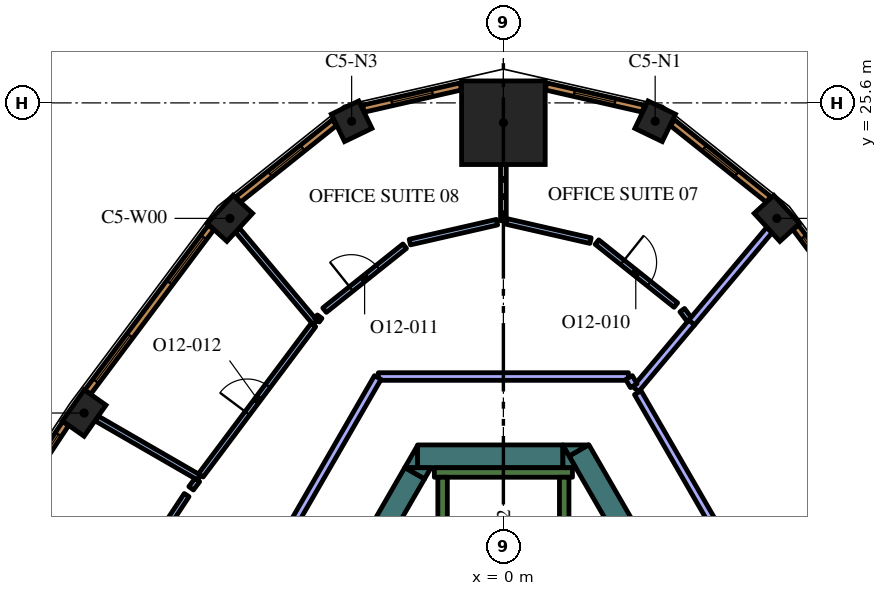
"""IFC4 building model, lengths in metres.
Left out: names, types, materials, properties, quantities, classifications, styles, units other than length and angle.
Written with IfcOpenShell. Run it as: python <this file> out.ifc"""

import sys

from ifc_helpers import new_model, si_unit, direction, frame, frame_2d, origin, origin_2d, place, context, subcontext, project, spatial, polyline, rectangle, outline, extrude, element, fill, save


model = new_model("IFC4")
c1 = context("Model", 3, precision=1e-05, world=origin(), true_north=direction((0.0, 1.0)))
c2 = subcontext(c1, "Body", "Model", "MODEL_VIEW")
j1 = project(units=[si_unit("LENGTHUNIT", "METRE"), si_unit("PLANEANGLEUNIT", "RADIAN")], contexts=[c1])
p1 = place(None, origin())
s1 = spatial("IfcSite", under=j1, at=p1, CompositionType="ELEMENT")
p2 = place(p1, origin())
s2 = spatial("IfcBuilding", under=s1, at=p2, CompositionType="ELEMENT")
p3 = place(p2, frame((0.0, 0.0, 283.8)))
s3 = spatial("IfcBuildingStorey", under=s2, at=p3, CompositionType="ELEMENT", Elevation=283.8)
p4 = place(p3, frame((0.0, 25.078, 0.0), z_axis=(0.0, 0.0, 1.0), x_axis=(0.0, 1.0, 0.0)))
e1 = element("IfcColumn", 1, at=p4, inside=s3, PredefinedType="COLUMN", context=c2, shape_type="SweptSolid", body=[
    extrude(rectangle(XDim=2.2, YDim=2.2, at=origin_2d()), origin(), (0.0, 0.0, 1.0), 4.2),
])
p5 = place(p3, frame((7.195, 22.561, 0.0), z_axis=(0.0, 0.0, 1.0), x_axis=(-0.67580250023, 0.737082750228, 0.0)))
e2 = element("IfcColumn", 2, at=p5, inside=s3, PredefinedType="COLUMN", context=c2, shape_type="SweptSolid", body=[
    extrude(rectangle(XDim=1.0, YDim=0.7, at=origin_2d()), origin(), (0.0, 0.0, 1.0), 4.2),
])
for number, where, z_axis, x_axis in (
    (3, (3.993, 25.116, 0.0), (0.0, 0.0, 1.0), (-0.901, 0.434, 0.0)),
    (4, (-3.993, 25.116, 0.0), (0.0, 0.0, 1.0), (-0.901, -0.434, 0.0)),
):
    element("IfcColumn", number, at=place(p3, frame(where, z_axis=z_axis, x_axis=x_axis)), inside=s3, PredefinedType="COLUMN", context=c2, shape_type="SweptSolid", body=[
        extrude(rectangle(XDim=0.8, YDim=0.8, at=origin_2d()), origin(), (0.0, 0.0, 1.0), 4.2),
    ])
for number, where, z_axis, x_axis in (
    (5, (-7.195, 22.561, 0.0), (0.0, 0.0, 1.0), (-0.676, -0.737, 0.0)),
    (6, (-11.032, 17.44, 0.0), (0.0, 0.0, 1.0), (-0.575, -0.818, 0.0)),
):
    element("IfcColumn", number, at=place(p3, frame(where, z_axis=z_axis, x_axis=x_axis)), inside=s3, PredefinedType="COLUMN", context=c2, shape_type="SweptSolid", body=[
        extrude(rectangle(XDim=1.0, YDim=0.7, at=origin_2d()), origin(), (0.0, 0.0, 1.0), 4.2),
    ])
p6 = place(p3, frame((1.989, 16.456, 0.0), z_axis=(0.0, 0.0, 1.0), x_axis=(0.49999102663, -0.8660305845, 0.0)))
e7 = element("IfcWall", 7, at=p6, inside=s3, PredefinedType="SOLIDWALL", context=c2, shape_type="SweptSolid", body=[
    extrude(rectangle(XDim=12.406, YDim=0.6, at=frame_2d((6.203, 0.0))), origin(), (0.0, 0.0, 1.0), 4.2),
])
p7 = place(p3, origin())
e8 = element("IfcWall", 8, at=p7, inside=s3, PredefinedType="SOLIDWALL", context=c2, shape_type="SweptSolid", body=[
    extrude(outline(polyline([(1.559, 16.6), (2.235, 16.6), (1.728, 16.307), (1.559, 16.6)])), origin(), (0.0, 0.0, 1.0), 4.2),
])
p8 = place(p3, frame((-2.258, 16.3, 0.0), z_axis=(0.0, 0.0, 1.0), x_axis=(1.0, 0.0, 0.0)))
e9 = element("IfcWall", 9, at=p8, inside=s3, PredefinedType="SOLIDWALL", context=c2, shape_type="SweptSolid", body=[
    extrude(rectangle(XDim=3.823, YDim=0.6, at=frame_2d((1.912, 0.0))), origin(), (0.0, 0.0, 1.0), 4.2),
])
e10 = element("IfcWall", 10, at=p7, inside=s3, PredefinedType="SOLIDWALL", context=c2, shape_type="SweptSolid", body=[
    extrude(outline(polyline([(1.905, 16.0), (1.567, 16.0), (1.567, 16.585), (1.905, 16.0)])), origin(), (0.0, 0.0, 1.0), 4.2),
])
e11 = element("IfcWall", 11, at=p7, inside=s3, PredefinedType="SOLIDWALL", context=c2, shape_type="SweptSolid", body=[
    extrude(outline(polyline([(-2.598, 16.0), (-2.26, 16.585), (-2.26, 16.0), (-2.598, 16.0)])), origin(), (0.0, 0.0, 1.0), 4.2),
])
p9 = place(p3, frame((-2.335, 15.855, 0.0), z_axis=(0.0, 0.0, 1.0), x_axis=(-0.499960127962, -0.866048422692, 0.0)))
e12 = element("IfcWall", 12, at=p9, inside=s3, PredefinedType="SOLIDWALL", context=c2, shape_type="SweptSolid", body=[
    extrude(rectangle(XDim=2.934, YDim=0.6, at=frame_2d((1.467, 0.0))), origin(), (0.0, 0.0, 1.0), 4.2),
])
e13 = element("IfcWall", 13, at=p7, inside=s3, PredefinedType="SOLIDWALL", context=c2, shape_type="SweptSolid", body=[
    extrude(outline(polyline([(-1.905, 16.0), (-2.074, 15.707), (-2.581, 16.0), (-1.905, 16.0)])), origin(), (0.0, 0.0, 1.0), 4.2),
])
p10 = place(p3, frame((-1.817, 15.875, 0.0), z_axis=(0.0, 0.0, 1.0), x_axis=(1.0, 0.0, 0.0)))
e14 = element("IfcWall", 14, at=p10, inside=s3, PredefinedType="SOLIDWALL", context=c2, shape_type="SweptSolid", body=[
    extrude(rectangle(XDim=3.634, YDim=0.25, at=frame_2d((1.817, 0.0))), origin(), (0.0, 0.0, 1.0), 4.2),
])
p11 = place(p3, frame((1.6, 8.95, 0.0), z_axis=(0.0, 0.0, 1.0), x_axis=(0.0, 1.0, 0.0)))
e15 = element("IfcWall", 15, at=p11, inside=s3, PredefinedType="SOLIDWALL", context=c2, shape_type="SweptSolid", body=[
    extrude(rectangle(XDim=6.8, YDim=0.25, at=frame_2d((3.4, 0.0))), origin(), (0.0, 0.0, 1.0), 4.2),
])
p12 = place(p3, frame((-1.6, 8.7, 0.0), z_axis=(0.0, 0.0, 1.0), x_axis=(0.0, 1.0, 0.0)))
e16 = element("IfcWall", 16, at=p12, inside=s3, PredefinedType="SOLIDWALL", context=c2, shape_type="SweptSolid", body=[
    extrude(rectangle(XDim=7.05, YDim=0.25, at=frame_2d((3.525, 0.0))), origin(), (0.0, 0.0, 1.0), 4.2),
])
p13 = place(p3, frame((4.95, 19.814, 0.0), z_axis=(0.0, 0.0, 1.0), x_axis=(0.642981953866, 0.765881326971, 0.0)))
e17 = element("IfcWall", 17, at=p13, inside=s3, PredefinedType="PARTITIONING", context=c2, shape_type="SweptSolid", body=[
    extrude(rectangle(XDim=3.188, YDim=0.2, at=frame_2d((1.594, 0.0))), origin(), (0.0, 0.0, 1.0), 3.55),
])
p14 = place(p3, frame((3.483, 18.067, 0.0), z_axis=(0.0, 0.0, 1.0), x_axis=(0.642896944312, 0.765952687177, 0.0)))
e18 = element("IfcWall", 18, at=p14, inside=s3, PredefinedType="PARTITIONING", context=c2, shape_type="SweptSolid", body=[
    extrude(rectangle(XDim=2.29, YDim=0.2, at=frame_2d((1.145, 0.0))), origin(), (0.0, 0.0, 1.0), 3.55),
])
p15 = place(p3, frame((7.421, 11.247, 0.0), z_axis=(0.0, 0.0, 1.0), x_axis=(-0.499999024953, 0.866025966727, 0.0)))
e19 = element("IfcWall", 19, at=p15, inside=s3, PredefinedType="PARTITIONING", context=c2, shape_type="SweptSolid", body=[
    extrude(rectangle(XDim=7.769, YDim=0.2, at=frame_2d((3.884, 0.0))), origin(), (0.0, 0.0, 1.0), 3.55),
])
p16 = place(p3, frame((0.0, 22.5, 0.0), z_axis=(0.0, 0.0, 1.0), x_axis=(0.0, 1.0, 0.0)))
e20 = element("IfcWall", 20, at=p16, inside=s3, PredefinedType="PARTITIONING", context=c2, shape_type="SweptSolid", body=[
    extrude(rectangle(XDim=1.479, YDim=0.15, at=frame_2d((0.739, 0.0))), origin(), (0.0, 0.0, 1.0), 3.55),
])
p17 = place(p3, frame((4.891, 19.899, 0.0), z_axis=(0.0, 0.0, 1.0), x_axis=(-0.6, 0.8, 0.0)))
e21 = element("IfcWall", 21, at=p17, inside=s3, PredefinedType="PARTITIONING", context=c2, shape_type="SweptSolid", body=[
    extrude(rectangle(XDim=0.309, YDim=0.15, at=frame_2d((0.154, 0.0))), origin(), (0.0, 0.0, 1.0), 3.55),
])
p18 = place(p3, frame((2.462, 21.937, 0.0), z_axis=(0.0, 0.0, 1.0), x_axis=(0.781630346222, -0.62374193531, 0.0)))
e22 = element("IfcWall", 22, at=p18, inside=s3, PredefinedType="PARTITIONING", context=c2, shape_type="SweptSolid", body=[
    extrude(rectangle(XDim=2.656, YDim=0.15, at=frame_2d((1.328, 0.0))), origin(), (0.0, 0.0, 1.0), 3.55),
])
p19 = place(p18, frame((0.857, 0.0, 0.0)))
e23 = element("IfcOpeningElement", 23, at=p19, cuts=e22, PredefinedType="OPENING", context=c2, shape_type="SweptSolid", body=[
    extrude(rectangle(XDim=0.9, YDim=2.1, at=frame_2d((0.45, 1.05))), frame((0.0, 0.085, 0.0), z_axis=(0.0, -1.0, 0.0), x_axis=(1.0, 0.0, 0.0)), (0.0, 0.0, 1.0), 0.17),
])
p20 = place(p3, frame((2.293, 21.976, 0.0), z_axis=(0.0, 0.0, 1.0), x_axis=(-0.974905760283, 0.22261796551, 0.0)))
e24 = element("IfcWall", 24, at=p20, inside=s3, PredefinedType="PARTITIONING", context=c2, shape_type="SweptSolid", body=[
    extrude(rectangle(XDim=2.276, YDim=0.15, at=frame_2d((1.138, 0.0))), origin(), (0.0, 0.0, 1.0), 3.55),
])
p21 = place(p3, frame((-4.952, 19.817, 0.0), z_axis=(0.0, 0.0, 1.0), x_axis=(-0.643023053688, 0.765846820471, 0.0)))
e25 = element("IfcWall", 25, at=p21, inside=s3, PredefinedType="PARTITIONING", context=c2, shape_type="SweptSolid", body=[
    extrude(rectangle(XDim=3.184, YDim=0.15, at=frame_2d((1.592, 0.0))), origin(), (0.0, 0.0, 1.0), 3.55),
])
p22 = place(p3, frame((-0.168, 22.461, 0.0), z_axis=(0.0, 0.0, 1.0), x_axis=(-0.974885550769, -0.222706450069, 0.0)))
e26 = element("IfcWall", 26, at=p22, inside=s3, PredefinedType="PARTITIONING", context=c2, shape_type="SweptSolid", body=[
    extrude(rectangle(XDim=2.353, YDim=0.15, at=frame_2d((1.176, 0.0))), origin(), (0.0, 0.0, 1.0), 3.55),
])
p23 = place(p3, frame((-4.706, 20.146, 0.0), z_axis=(0.0, 0.0, 1.0), x_axis=(0.781592149204, 0.623789798172, 0.0)))
e27 = element("IfcWall", 27, at=p23, inside=s3, PredefinedType="PARTITIONING", context=c2, shape_type="SweptSolid", body=[
    extrude(rectangle(XDim=2.698, YDim=0.15, at=frame_2d((1.349, 0.0))), origin(), (0.0, 0.0, 1.0), 3.55),
])
p24 = place(p23, frame((0.898, 0.0, 0.0)))
e28 = element("IfcOpeningElement", 28, at=p24, cuts=e27, PredefinedType="OPENING", context=c2, shape_type="SweptSolid", body=[
    extrude(rectangle(XDim=0.9, YDim=2.1, at=frame_2d((0.45, 1.05))), frame((0.0, 0.085, 0.0), z_axis=(0.0, -1.0, 0.0), x_axis=(1.0, 0.0, 0.0)), (0.0, 0.0, 1.0), 0.17),
])
p25 = place(p3, frame((-4.834, 19.975, 0.0), z_axis=(0.0, 0.0, 1.0), x_axis=(-0.599349659863, -0.800487342325, 0.0)))
e29 = element("IfcWall", 29, at=p25, inside=s3, PredefinedType="PARTITIONING", context=c2, shape_type="SweptSolid", body=[
    extrude(rectangle(XDim=0.12, YDim=0.15, at=frame_2d((0.06, 0.0))), origin(), (0.0, 0.0, 1.0), 3.55),
])
p26 = place(p3, frame((-8.007, 15.74, 0.0), z_axis=(0.0, 0.0, 1.0), x_axis=(-0.866044607523, 0.499966736674, 0.0)))
e30 = element("IfcWall", 30, at=p26, inside=s3, PredefinedType="PARTITIONING", context=c2, shape_type="SweptSolid", body=[
    extrude(rectangle(XDim=3.115, YDim=0.15, at=frame_2d((1.557, 0.0))), origin(), (0.0, 0.0, 1.0), 3.55),
])
p27 = place(p3, frame((-7.962, 15.8, 0.0), z_axis=(0.0, 0.0, 1.0), x_axis=(0.599541489613, 0.800343677574, 0.0)))
e31 = element("IfcWall", 31, at=p27, inside=s3, PredefinedType="PARTITIONING", context=c2, shape_type="SweptSolid", body=[
    extrude(rectangle(XDim=4.942, YDim=0.15, at=frame_2d((2.471, 0.0))), origin(), (0.0, 0.0, 1.0), 3.55),
])
p28 = place(p27, frame((2.042, 0.0, 0.0)))
e32 = element("IfcOpeningElement", 32, at=p28, cuts=e31, PredefinedType="OPENING", context=c2, shape_type="SweptSolid", body=[
    extrude(rectangle(XDim=0.9, YDim=2.1, at=frame_2d((0.45, 1.05))), frame((0.0, 0.085, 0.0), z_axis=(0.0, -1.0, 0.0), x_axis=(1.0, 0.0, 0.0)), (0.0, 0.0, 1.0), 0.17),
])
p29 = place(p3, frame((-8.052, 15.679, 0.0), z_axis=(0.0, 0.0, 1.0), x_axis=(-0.599004157744, -0.800745914136, 0.0)))
e33 = element("IfcWall", 33, at=p29, inside=s3, PredefinedType="PARTITIONING", context=c2, shape_type="SweptSolid", body=[
    extrude(rectangle(XDim=0.275, YDim=0.15, at=frame_2d((0.137, 0.0))), origin(), (0.0, 0.0, 1.0), 3.55),
])
p30 = place(p3, frame((-11.523, 10.449, 0.0), z_axis=(0.0, 0.0, 1.0), x_axis=(0.550751709023, 0.834669129061, 0.0)))
e34 = element("IfcWall", 34, at=p30, inside=s3, PredefinedType="PARTITIONING", context=c2, shape_type="SweptSolid", body=[
    extrude(rectangle(XDim=5.788, YDim=0.15, at=frame_2d((2.894, 0.0))), origin(), (0.0, 0.0, 1.0), 3.55),
])
p31 = place(p30, frame((2.488, 0.0, 0.0)))
e35 = element("IfcOpeningElement", 35, at=p31, cuts=e34, PredefinedType="OPENING", context=c2, shape_type="SweptSolid", body=[
    extrude(rectangle(XDim=0.9, YDim=2.1, at=frame_2d((0.45, 1.05))), frame((0.0, 0.085, 0.0), z_axis=(0.0, -1.0, 0.0), x_axis=(1.0, 0.0, 0.0)), (0.0, 0.0, 1.0), 0.17),
])
p32 = place(p3, frame((3.291, 18.4, 0.0), z_axis=(0.0, 0.0, 1.0), x_axis=(-1.0, 0.0, 0.0)))
e36 = element("IfcWall", 36, at=p32, inside=s3, PredefinedType="PARTITIONING", context=c2, shape_type="SweptSolid", body=[
    extrude(rectangle(XDim=6.582, YDim=0.2, at=frame_2d((3.291, 0.0))), origin(), (0.0, 0.0, 1.0), 3.55),
])
p33 = place(p3, frame((-3.306, 18.374, 0.0), z_axis=(0.0, 0.0, 1.0), x_axis=(-0.499999798456, -0.866025520146, 0.0)))
e37 = element("IfcWall", 37, at=p33, inside=s3, PredefinedType="PARTITIONING", context=c2, shape_type="SweptSolid", body=[
    extrude(rectangle(XDim=8.229, YDim=0.2, at=frame_2d((4.115, 0.0))), origin(), (0.0, 0.0, 1.0), 3.55),
])
p34 = place(p3, frame((3.43, 18.159, 0.0), z_axis=(0.0, 0.0, 1.0), x_axis=(-0.499949632511, 0.866054481515, 0.0)))
e38 = element("IfcWall", 38, at=p34, inside=s3, PredefinedType="PARTITIONING", context=c2, shape_type="SweptSolid", body=[
    extrude(rectangle(XDim=0.248, YDim=0.2, at=frame_2d((0.124, 0.0))), origin(), (0.0, 0.0, 1.0), 3.55),
])
p35 = place(p3, frame((10.938, 17.99, 0.0), z_axis=(0.0, 0.0, 1.0), x_axis=(-0.599559865294, 0.800329911929, 0.0)))
e39 = element("IfcWall", 39, at=p35, inside=s3, PredefinedType="SOLIDWALL", context=c2, shape_type="SweptSolid", body=[
    extrude(rectangle(XDim=5.415, YDim=0.19, at=frame_2d((2.708, 0.0))), origin(), (0.0, 0.0, 1.0), 3.95),
])
p36 = place(p35, frame((0.358, 0.0, 0.6)))
e40 = element("IfcOpeningElement", 40, at=p36, cuts=e39, PredefinedType="OPENING", context=c2, shape_type="SweptSolid", body=[
    extrude(rectangle(XDim=1.5, YDim=2.85, at=frame_2d((0.75, 1.425))), frame((0.0, 0.105, 0.0), z_axis=(0.0, -1.0, 0.0), x_axis=(1.0, 0.0, 0.0)), (0.0, 0.0, 1.0), 0.21),
])
p37 = place(p35, frame((3.593, 0.0, 0.6)))
e41 = element("IfcOpeningElement", 41, at=p37, cuts=e39, PredefinedType="OPENING", context=c2, shape_type="SweptSolid", body=[
    extrude(rectangle(XDim=1.5, YDim=2.85, at=frame_2d((0.75, 1.425))), frame((0.0, 0.105, 0.0), z_axis=(0.0, -1.0, 0.0), x_axis=(1.0, 0.0, 0.0)), (0.0, 0.0, 1.0), 0.21),
])
p38 = place(p3, frame((6.977, 23.061, 0.0), z_axis=(0.0, 0.0, 1.0), x_axis=(-0.781626234064, 0.623747088349, 0.0)))
e42 = element("IfcWall", 42, at=p38, inside=s3, PredefinedType="SOLIDWALL", context=c2, shape_type="SweptSolid", body=[
    extrude(rectangle(XDim=3.237, YDim=0.19, at=frame_2d((1.618, 0.0))), origin(), (0.0, 0.0, 1.0), 3.95),
])
p39 = place(p38, frame((1.068, 0.0, 0.6)))
e43 = element("IfcOpeningElement", 43, at=p39, cuts=e42, PredefinedType="OPENING", context=c2, shape_type="SweptSolid", body=[
    extrude(rectangle(XDim=1.1, YDim=2.85, at=frame_2d((0.55, 1.425))), frame((0.0, 0.105, 0.0), z_axis=(0.0, -1.0, 0.0), x_axis=(1.0, 0.0, 0.0)), (0.0, 0.0, 1.0), 0.21),
])
p40 = place(p3, frame((3.683, 25.449, 0.0), z_axis=(0.0, 0.0, 1.0), x_axis=(-0.974913273386, 0.222585060988, 0.0)))
e44 = element("IfcWall", 44, at=p40, inside=s3, PredefinedType="SOLIDWALL", context=c2, shape_type="SweptSolid", body=[
    extrude(rectangle(XDim=2.627, YDim=0.19, at=frame_2d((1.313, 0.0))), origin(), (0.0, 0.0, 1.0), 3.95),
])
p41 = place(p40, frame((0.763, 0.0, 0.6)))
e45 = element("IfcOpeningElement", 45, at=p41, cuts=e44, PredefinedType="OPENING", context=c2, shape_type="SweptSolid", body=[
    extrude(rectangle(XDim=1.1, YDim=2.85, at=frame_2d((0.55, 1.425))), frame((0.0, 0.105, 0.0), z_axis=(0.0, -1.0, 0.0), x_axis=(1.0, 0.0, 0.0)), (0.0, 0.0, 1.0), 0.21),
])
p42 = place(p3, frame((-1.122, 26.033, 0.0), z_axis=(0.0, 0.0, 1.0), x_axis=(-0.974913273386, -0.222585060988, 0.0)))
e46 = element("IfcWall", 46, at=p42, inside=s3, PredefinedType="SOLIDWALL", context=c2, shape_type="SweptSolid", body=[
    extrude(rectangle(XDim=2.627, YDim=0.19, at=frame_2d((1.313, 0.0))), origin(), (0.0, 0.0, 1.0), 3.95),
])
p43 = place(p42, frame((0.763, 0.0, 0.6)))
e47 = element("IfcOpeningElement", 47, at=p43, cuts=e46, PredefinedType="OPENING", context=c2, shape_type="SweptSolid", body=[
    extrude(rectangle(XDim=1.1, YDim=2.85, at=frame_2d((0.55, 1.425))), frame((0.0, 0.105, 0.0), z_axis=(0.0, -1.0, 0.0), x_axis=(1.0, 0.0, 0.0)), (0.0, 0.0, 1.0), 0.21),
])
p44 = place(p3, frame((-4.448, 25.08, 0.0), z_axis=(0.0, 0.0, 1.0), x_axis=(-0.781626234064, -0.623747088349, 0.0)))
e48 = element("IfcWall", 48, at=p44, inside=s3, PredefinedType="SOLIDWALL", context=c2, shape_type="SweptSolid", body=[
    extrude(rectangle(XDim=3.237, YDim=0.19, at=frame_2d((1.618, 0.0))), origin(), (0.0, 0.0, 1.0), 3.95),
])
p45 = place(p44, frame((1.068, 0.0, 0.6)))
e49 = element("IfcOpeningElement", 49, at=p45, cuts=e48, PredefinedType="OPENING", context=c2, shape_type="SweptSolid", body=[
    extrude(rectangle(XDim=1.1, YDim=2.85, at=frame_2d((0.55, 1.425))), frame((0.0, 0.105, 0.0), z_axis=(0.0, -1.0, 0.0), x_axis=(1.0, 0.0, 0.0)), (0.0, 0.0, 1.0), 0.21),
])
p46 = place(p3, frame((-7.692, 22.324, 0.0), z_axis=(0.0, 0.0, 1.0), x_axis=(-0.599559865294, -0.800329911929, 0.0)))
e50 = element("IfcWall", 50, at=p46, inside=s3, PredefinedType="SOLIDWALL", context=c2, shape_type="SweptSolid", body=[
    extrude(rectangle(XDim=5.415, YDim=0.19, at=frame_2d((2.708, 0.0))), origin(), (0.0, 0.0, 1.0), 3.95),
])
p47 = place(p46, frame((0.323, 0.0, 0.6)))
e51 = element("IfcOpeningElement", 51, at=p47, cuts=e50, PredefinedType="OPENING", context=c2, shape_type="SweptSolid", body=[
    extrude(rectangle(XDim=1.5, YDim=2.85, at=frame_2d((0.75, 1.425))), frame((0.0, 0.105, 0.0), z_axis=(0.0, -1.0, 0.0), x_axis=(1.0, 0.0, 0.0)), (0.0, 0.0, 1.0), 0.21),
])
p48 = place(p46, frame((3.558, 0.0, 0.6)))
e52 = element("IfcOpeningElement", 52, at=p48, cuts=e50, PredefinedType="OPENING", context=c2, shape_type="SweptSolid", body=[
    extrude(rectangle(XDim=1.5, YDim=2.85, at=frame_2d((0.75, 1.425))), frame((0.0, 0.105, 0.0), z_axis=(0.0, -1.0, 0.0), x_axis=(1.0, 0.0, 0.0)), (0.0, 0.0, 1.0), 0.21),
])
p49 = place(p3, frame((-11.518, 17.166, 0.0), z_axis=(0.0, 0.0, 1.0), x_axis=(-0.550744054781, -0.83467417962, 0.0)))
e53 = element("IfcWall", 53, at=p49, inside=s3, PredefinedType="SOLIDWALL", context=c2, shape_type="SweptSolid", body=[
    extrude(rectangle(XDim=5.406, YDim=0.19, at=frame_2d((2.703, 0.0))), origin(), (0.0, 0.0, 1.0), 3.95),
])
p50 = place(p49, frame((0.346, 0.0, 0.6)))
e54 = element("IfcOpeningElement", 54, at=p50, cuts=e53, PredefinedType="OPENING", context=c2, shape_type="SweptSolid", body=[
    extrude(rectangle(XDim=1.5, YDim=2.85, at=frame_2d((0.75, 1.425))), frame((0.0, 0.105, 0.0), z_axis=(0.0, -1.0, 0.0), x_axis=(1.0, 0.0, 0.0)), (0.0, 0.0, 1.0), 0.21),
])
p51 = place(p49, frame((3.559, 0.0, 0.6)))
e55 = element("IfcOpeningElement", 55, at=p51, cuts=e53, PredefinedType="OPENING", context=c2, shape_type="SweptSolid", body=[
    extrude(rectangle(XDim=1.5, YDim=2.85, at=frame_2d((0.75, 1.425))), frame((0.0, 0.105, 0.0), z_axis=(0.0, -1.0, 0.0), x_axis=(1.0, 0.0, 0.0)), (0.0, 0.0, 1.0), 0.21),
])
p52 = place(p19, origin())
e56 = element("IfcDoor", 56, at=p52, inside=s3, OperationType="SINGLE_SWING_LEFT", PredefinedType="DOOR", context=c2, shape_type="SweptSolid", body=[
    extrude(rectangle(XDim=0.9, YDim=2.1, at=frame_2d((0.45, 1.05))), frame((0.0, 0.025, 0.0), z_axis=(0.0, -1.0, 0.0), x_axis=(1.0, 0.0, 0.0)), (0.0, 0.0, 1.0), 0.05),
])
fill(e23, e56)
p53 = place(p24, origin())
e57 = element("IfcDoor", 57, at=p53, inside=s3, OperationType="SINGLE_SWING_LEFT", PredefinedType="DOOR", context=c2, shape_type="SweptSolid", body=[
    extrude(rectangle(XDim=0.9, YDim=2.1, at=frame_2d((0.45, 1.05))), frame((0.0, 0.025, 0.0), z_axis=(0.0, -1.0, 0.0), x_axis=(1.0, 0.0, 0.0)), (0.0, 0.0, 1.0), 0.05),
])
fill(e28, e57)
p54 = place(p28, origin())
e58 = element("IfcDoor", 58, at=p54, inside=s3, OperationType="SINGLE_SWING_RIGHT", PredefinedType="DOOR", context=c2, shape_type="SweptSolid", body=[
    extrude(rectangle(XDim=0.9, YDim=2.1, at=frame_2d((0.45, 1.05))), frame((0.0, 0.025, 0.0), z_axis=(0.0, -1.0, 0.0), x_axis=(1.0, 0.0, 0.0)), (0.0, 0.0, 1.0), 0.05),
])
fill(e32, e58)
p55 = place(p37, origin())
e59 = element("IfcWindow", 59, at=p55, inside=s3, PartitioningType="SINGLE_PANEL", PredefinedType="WINDOW", context=c2, shape_type="SweptSolid", body=[
    extrude(rectangle(XDim=1.5, YDim=2.85, at=frame_2d((0.75, 1.425))), frame((0.0, 0.045, 0.0), z_axis=(0.0, -1.0, 0.0), x_axis=(1.0, 0.0, 0.0)), (0.0, 0.0, 1.0), 0.06),
])
fill(e41, e59)
p56 = place(p39, origin())
e60 = element("IfcWindow", 60, at=p56, inside=s3, PartitioningType="SINGLE_PANEL", PredefinedType="WINDOW", context=c2, shape_type="SweptSolid", body=[
    extrude(rectangle(XDim=1.1, YDim=2.85, at=frame_2d((0.55, 1.425))), frame((0.0, 0.045, 0.0), z_axis=(0.0, -1.0, 0.0), x_axis=(1.0, 0.0, 0.0)), (0.0, 0.0, 1.0), 0.06),
])
fill(e43, e60)
p57 = place(p41, origin())
e61 = element("IfcWindow", 61, at=p57, inside=s3, PartitioningType="SINGLE_PANEL", PredefinedType="WINDOW", context=c2, shape_type="SweptSolid", body=[
    extrude(rectangle(XDim=1.1, YDim=2.85, at=frame_2d((0.55, 1.425))), frame((0.0, 0.045, 0.0), z_axis=(0.0, -1.0, 0.0), x_axis=(1.0, 0.0, 0.0)), (0.0, 0.0, 1.0), 0.06),
])
fill(e45, e61)
p58 = place(p43, origin())
e62 = element("IfcWindow", 62, at=p58, inside=s3, PartitioningType="SINGLE_PANEL", PredefinedType="WINDOW", context=c2, shape_type="SweptSolid", body=[
    extrude(rectangle(XDim=1.1, YDim=2.85, at=frame_2d((0.55, 1.425))), frame((0.0, 0.045, 0.0), z_axis=(0.0, -1.0, 0.0), x_axis=(1.0, 0.0, 0.0)), (0.0, 0.0, 1.0), 0.06),
])
fill(e47, e62)
p59 = place(p45, origin())
e63 = element("IfcWindow", 63, at=p59, inside=s3, PartitioningType="SINGLE_PANEL", PredefinedType="WINDOW", context=c2, shape_type="SweptSolid", body=[
    extrude(rectangle(XDim=1.1, YDim=2.85, at=frame_2d((0.55, 1.425))), frame((0.0, 0.045, 0.0), z_axis=(0.0, -1.0, 0.0), x_axis=(1.0, 0.0, 0.0)), (0.0, 0.0, 1.0), 0.06),
])
fill(e49, e63)
p60 = place(p47, origin())
e64 = element("IfcWindow", 64, at=p60, inside=s3, PartitioningType="SINGLE_PANEL", PredefinedType="WINDOW", context=c2, shape_type="SweptSolid", body=[
    extrude(rectangle(XDim=1.5, YDim=2.85, at=frame_2d((0.75, 1.425))), frame((0.0, 0.045, 0.0), z_axis=(0.0, -1.0, 0.0), x_axis=(1.0, 0.0, 0.0)), (0.0, 0.0, 1.0), 0.06),
])
fill(e51, e64)
p61 = place(p48, origin())
e65 = element("IfcWindow", 65, at=p61, inside=s3, PartitioningType="SINGLE_PANEL", PredefinedType="WINDOW", context=c2, shape_type="SweptSolid", body=[
    extrude(rectangle(XDim=1.5, YDim=2.85, at=frame_2d((0.75, 1.425))), frame((0.0, 0.045, 0.0), z_axis=(0.0, -1.0, 0.0), x_axis=(1.0, 0.0, 0.0)), (0.0, 0.0, 1.0), 0.06),
])
fill(e52, e65)
p62 = place(p50, origin())
e66 = element("IfcWindow", 66, at=p62, inside=s3, PartitioningType="SINGLE_PANEL", PredefinedType="WINDOW", context=c2, shape_type="SweptSolid", body=[
    extrude(rectangle(XDim=1.5, YDim=2.85, at=frame_2d((0.75, 1.425))), frame((0.0, 0.045, 0.0), z_axis=(0.0, -1.0, 0.0), x_axis=(1.0, 0.0, 0.0)), (0.0, 0.0, 1.0), 0.06),
])
fill(e54, e66)
save(model, sys.argv[1])
